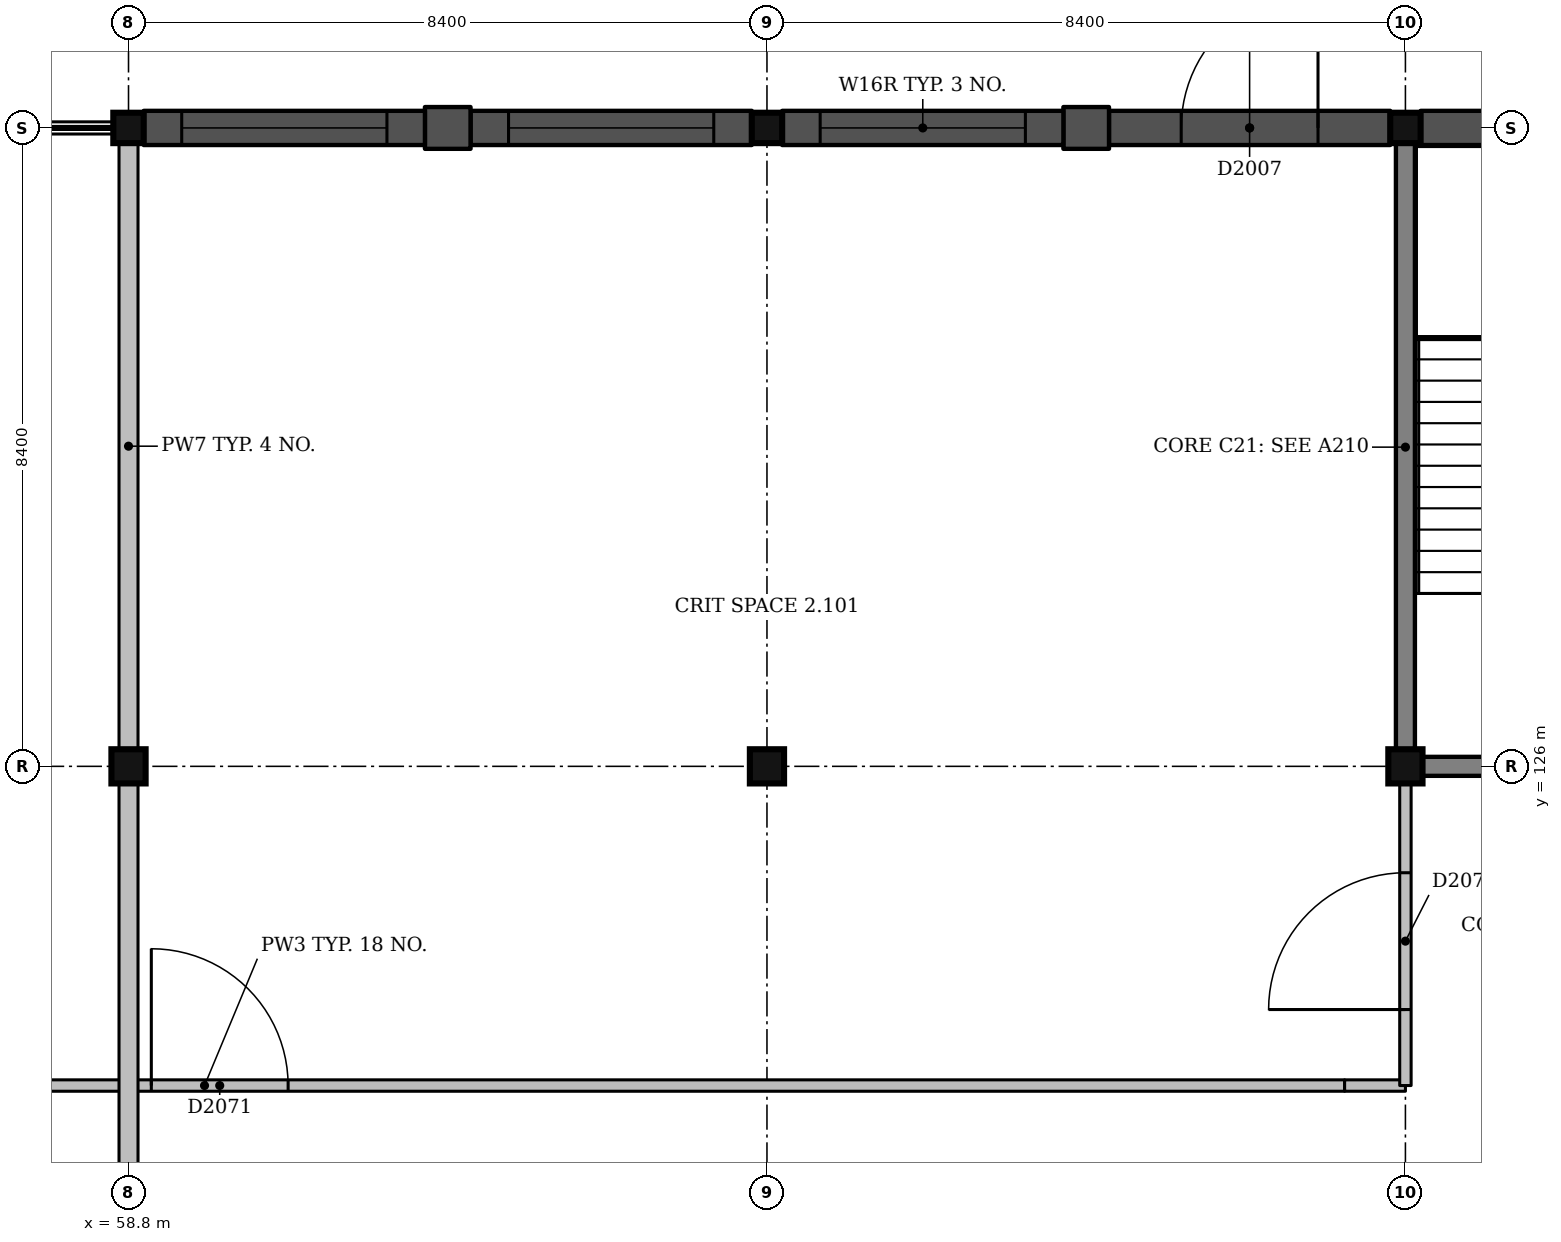
"""IFC4 building model, lengths in metres.
Left out: names, types, materials, properties, quantities, classifications, styles, units other than length and angle.
Written with IfcOpenShell. Run it as: python <this file> out.ifc"""

import sys

from ifc_helpers import new_model, si_unit, direction, frame, frame_2d, origin, origin_2d, place, context, subcontext, project, spatial, rectangle, extrude, element, fill, save


model = new_model("IFC4")
c1 = context("Model", 3, precision=1e-05, world=origin(), true_north=direction((0.0, 1.0)))
c2 = subcontext(c1, "Body", "Model", "MODEL_VIEW")
j1 = project(units=[si_unit("LENGTHUNIT", "METRE"), si_unit("PLANEANGLEUNIT", "RADIAN")], contexts=[c1])
p1 = place(None, origin())
s1 = spatial("IfcSite", under=j1, at=p1, CompositionType="ELEMENT")
p2 = place(p1, origin())
s2 = spatial("IfcBuilding", under=s1, at=p2, CompositionType="ELEMENT")
p3 = place(p2, frame((0.0, 0.0, 9.0)))
s3 = spatial("IfcBuildingStorey", under=s2, at=p3, CompositionType="ELEMENT", Elevation=9.0)
p4 = place(p3, frame((58.8, 126.0, -1.5), z_axis=(0.0, 0.0, 1.0), x_axis=(1.0, 0.0, 0.0)))
e1 = element("IfcColumn", 1, at=p4, inside=s3, PredefinedType="COLUMN", context=c2, shape_type="SweptSolid", body=[
    extrude(rectangle(XDim=0.45, YDim=0.45, at=origin_2d()), origin(), (0.0, 0.0, 1.0), 6.0),
])
p5 = place(p3, frame((58.8, 134.4, -1.5), z_axis=(0.0, 0.0, 1.0), x_axis=(1.0, 0.0, 0.0)))
e2 = element("IfcColumn", 2, at=p5, inside=s3, PredefinedType="COLUMN", context=c2, shape_type="SweptSolid", body=[
    extrude(rectangle(XDim=0.4, YDim=0.4, at=origin_2d()), origin(), (0.0, 0.0, 1.0), 6.0),
])
p6 = place(p3, frame((67.2, 126.0, -1.5), z_axis=(0.0, 0.0, 1.0), x_axis=(1.0, 0.0, 0.0)))
e3 = element("IfcColumn", 3, at=p6, inside=s3, PredefinedType="COLUMN", context=c2, shape_type="SweptSolid", body=[
    extrude(rectangle(XDim=0.45, YDim=0.45, at=origin_2d()), origin(), (0.0, 0.0, 1.0), 6.0),
])
p7 = place(p3, frame((67.2, 134.4, -1.5), z_axis=(0.0, 0.0, 1.0), x_axis=(1.0, 0.0, 0.0)))
e4 = element("IfcColumn", 4, at=p7, inside=s3, PredefinedType="COLUMN", context=c2, shape_type="SweptSolid", body=[
    extrude(rectangle(XDim=0.4, YDim=0.4, at=origin_2d()), origin(), (0.0, 0.0, 1.0), 6.0),
])
p8 = place(p3, frame((75.6, 126.0, -1.5), z_axis=(0.0, 0.0, 1.0), x_axis=(1.0, 0.0, 0.0)))
e5 = element("IfcColumn", 5, at=p8, inside=s3, PredefinedType="COLUMN", context=c2, shape_type="SweptSolid", body=[
    extrude(rectangle(XDim=0.45, YDim=0.45, at=origin_2d()), origin(), (0.0, 0.0, 1.0), 6.0),
])
p9 = place(p3, frame((75.6, 134.4, -1.5), z_axis=(0.0, 0.0, 1.0), x_axis=(1.0, 0.0, 0.0)))
e6 = element("IfcColumn", 6, at=p9, inside=s3, PredefinedType="COLUMN", context=c2, shape_type="SweptSolid", body=[
    extrude(rectangle(XDim=0.4, YDim=0.4, at=origin_2d()), origin(), (0.0, 0.0, 1.0), 6.0),
])
p10 = place(p3, frame((75.825, 126.0, 0.0), z_axis=(0.0, 0.0, 1.0), x_axis=(1.0, 0.0, 0.0)))
e7 = element("IfcWall", 7, at=p10, inside=s3, PredefinedType="SHEAR", context=c2, shape_type="SweptSolid", body=[
    extrude(rectangle(XDim=5.5, YDim=0.25, at=frame_2d((2.75, 0.0))), origin(), (0.0, 0.0, 1.0), 4.5),
])
p11 = place(p10, frame((2.05, 0.0, 0.0)))
e8 = element("IfcOpeningElement", 8, at=p11, cuts=e7, PredefinedType="OPENING", context=c2, shape_type="SweptSolid", body=[
    extrude(rectangle(XDim=1.0, YDim=2.1, at=frame_2d((0.5, 1.05))), frame((0.0, 0.135, 0.0), z_axis=(0.0, -1.0, 0.0), x_axis=(1.0, 0.0, 0.0)), (0.0, 0.0, 1.0), 0.27),
])
p12 = place(p3, frame((75.6, 126.225, 0.0), z_axis=(0.0, 0.0, 1.0), x_axis=(0.0, 1.0, 0.0)))
e9 = element("IfcWall", 9, at=p12, inside=s3, PredefinedType="SHEAR", context=c2, shape_type="SweptSolid", body=[
    extrude(rectangle(XDim=7.975, YDim=0.25, at=frame_2d((3.987, 0.0))), origin(), (0.0, 0.0, 1.0), 4.5),
])
p13 = place(p3, frame((79.5, 134.4, 0.0), z_axis=(0.0, 0.0, 1.0), x_axis=(-1.0, 0.0, 0.0)))
e10 = element("IfcWall", 10, at=p13, inside=s3, PredefinedType="SOLIDWALL", context=c2, shape_type="SweptSolid", body=[
    extrude(rectangle(XDim=3.7, YDim=0.45, at=frame_2d((1.85, 0.0))), origin(), (0.0, 0.0, 1.0), 3.45),
])
p14 = place(p3, frame((75.4, 134.4, 0.0), z_axis=(0.0, 0.0, 1.0), x_axis=(-1.0, 0.0, 0.0)))
e11 = element("IfcWall", 11, at=p14, inside=s3, PredefinedType="SOLIDWALL", context=c2, shape_type="SweptSolid", body=[
    extrude(rectangle(XDim=3.7, YDim=0.45, at=frame_2d((1.85, 0.0))), origin(), (0.0, 0.0, 1.0), 3.45),
])
p15 = place(p14, frame((0.95, 0.0, 0.0)))
e12 = element("IfcOpeningElement", 12, at=p15, cuts=e11, PredefinedType="OPENING", context=c2, shape_type="SweptSolid", body=[
    extrude(rectangle(XDim=1.8, YDim=2.1, at=frame_2d((0.9, 1.05))), frame((0.0, 0.235, 0.0), z_axis=(0.0, -1.0, 0.0), x_axis=(1.0, 0.0, 0.0)), (0.0, 0.0, 1.0), 0.47),
])
p16 = place(p3, frame((71.7, 134.4, 0.0), z_axis=(0.0, 0.0, 1.0), x_axis=(-1.0, 0.0, 0.0)))
e13 = element("IfcWall", 13, at=p16, inside=s3, PredefinedType="SOLIDWALL", context=c2, shape_type="SweptSolid", body=[
    extrude(rectangle(XDim=0.6, YDim=0.55, at=frame_2d((0.3, 0.0))), origin(), (0.0, 0.0, 1.0), 3.45),
])
p17 = place(p3, frame((71.1, 134.4, 0.0), z_axis=(0.0, 0.0, 1.0), x_axis=(-1.0, 0.0, 0.0)))
e14 = element("IfcWall", 14, at=p17, inside=s3, PredefinedType="SOLIDWALL", context=c2, shape_type="SweptSolid", body=[
    extrude(rectangle(XDim=3.7, YDim=0.45, at=frame_2d((1.85, 0.0))), origin(), (0.0, 0.0, 1.0), 3.45),
])
p18 = place(p17, frame((0.5, 0.0, 0.6)))
e15 = element("IfcOpeningElement", 15, at=p18, cuts=e14, PredefinedType="OPENING", context=c2, shape_type="SweptSolid", body=[
    extrude(rectangle(XDim=2.7, YDim=2.4, at=frame_2d((1.35, 1.2))), frame((0.0, 0.235, 0.0), z_axis=(0.0, -1.0, 0.0), x_axis=(1.0, 0.0, 0.0)), (0.0, 0.0, 1.0), 0.47),
])
p19 = place(p3, frame((67.0, 134.4, 0.0), z_axis=(0.0, 0.0, 1.0), x_axis=(-1.0, 0.0, 0.0)))
e16 = element("IfcWall", 16, at=p19, inside=s3, PredefinedType="SOLIDWALL", context=c2, shape_type="SweptSolid", body=[
    extrude(rectangle(XDim=3.7, YDim=0.45, at=frame_2d((1.85, 0.0))), origin(), (0.0, 0.0, 1.0), 3.45),
])
p20 = place(p19, frame((0.5, 0.0, 0.6)))
e17 = element("IfcOpeningElement", 17, at=p20, cuts=e16, PredefinedType="OPENING", context=c2, shape_type="SweptSolid", body=[
    extrude(rectangle(XDim=2.7, YDim=2.4, at=frame_2d((1.35, 1.2))), frame((0.0, 0.235, 0.0), z_axis=(0.0, -1.0, 0.0), x_axis=(1.0, 0.0, 0.0)), (0.0, 0.0, 1.0), 0.47),
])
p21 = place(p3, frame((63.3, 134.4, 0.0), z_axis=(0.0, 0.0, 1.0), x_axis=(-1.0, 0.0, 0.0)))
e18 = element("IfcWall", 18, at=p21, inside=s3, PredefinedType="SOLIDWALL", context=c2, shape_type="SweptSolid", body=[
    extrude(rectangle(XDim=0.6, YDim=0.55, at=frame_2d((0.3, 0.0))), origin(), (0.0, 0.0, 1.0), 3.45),
])
p22 = place(p3, frame((62.7, 134.4, 0.0), z_axis=(0.0, 0.0, 1.0), x_axis=(-1.0, 0.0, 0.0)))
e19 = element("IfcWall", 19, at=p22, inside=s3, PredefinedType="SOLIDWALL", context=c2, shape_type="SweptSolid", body=[
    extrude(rectangle(XDim=3.7, YDim=0.45, at=frame_2d((1.85, 0.0))), origin(), (0.0, 0.0, 1.0), 3.45),
])
p23 = place(p22, frame((0.5, 0.0, 0.6)))
e20 = element("IfcOpeningElement", 20, at=p23, cuts=e19, PredefinedType="OPENING", context=c2, shape_type="SweptSolid", body=[
    extrude(rectangle(XDim=2.7, YDim=2.4, at=frame_2d((1.35, 1.2))), frame((0.0, 0.235, 0.0), z_axis=(0.0, -1.0, 0.0), x_axis=(1.0, 0.0, 0.0)), (0.0, 0.0, 1.0), 0.47),
])
p24 = place(p3, frame((44.8, 121.8, 0.0), z_axis=(0.0, 0.0, 1.0), x_axis=(1.0, 0.0, 0.0)))
e21 = element("IfcWall", 21, at=p24, inside=s3, PredefinedType="PARTITIONING", context=c2, shape_type="SweptSolid", body=[
    extrude(rectangle(XDim=30.0, YDim=0.15, at=frame_2d((15.0, 0.0))), origin(), (0.0, 0.0, 1.0), 3.35),
])
p25 = place(p24, frame((9.05, 0.0, 0.0)))
e22 = element("IfcOpeningElement", 22, at=p25, cuts=e21, PredefinedType="OPENING", context=c2, shape_type="SweptSolid", body=[
    extrude(rectangle(XDim=1.8, YDim=2.1, at=frame_2d((0.9, 1.05))), frame((0.0, 0.085, 0.0), z_axis=(0.0, -1.0, 0.0), x_axis=(1.0, 0.0, 0.0)), (0.0, 0.0, 1.0), 0.17),
])
p26 = place(p24, frame((14.3, 0.0, 0.0)))
e23 = element("IfcOpeningElement", 23, at=p26, cuts=e21, PredefinedType="OPENING", context=c2, shape_type="SweptSolid", body=[
    extrude(rectangle(XDim=1.8, YDim=2.1, at=frame_2d((0.9, 1.05))), frame((0.0, 0.085, 0.0), z_axis=(0.0, -1.0, 0.0), x_axis=(1.0, 0.0, 0.0)), (0.0, 0.0, 1.0), 0.17),
])
p27 = place(p3, frame((74.8, 121.8, 0.0), z_axis=(0.0, 0.0, 1.0), x_axis=(1.0, 0.0, 0.0)))
e24 = element("IfcWall", 24, at=p27, inside=s3, PredefinedType="PARTITIONING", context=c2, shape_type="SweptSolid", body=[
    extrude(rectangle(XDim=0.8, YDim=0.15, at=frame_2d((0.4, 0.0))), origin(), (0.0, 0.0, 1.0), 3.4),
])
p28 = place(p3, frame((58.8, 117.825, 0.0), z_axis=(0.0, 0.0, 1.0), x_axis=(0.0, 1.0, 0.0)))
e25 = element("IfcWall", 25, at=p28, inside=s3, PredefinedType="SOLIDWALL", context=c2, shape_type="SweptSolid", body=[
    extrude(rectangle(XDim=7.95, YDim=0.25, at=frame_2d((3.975, 0.0))), origin(), (0.0, 0.0, 1.0), 3.35),
])
p29 = place(p28, frame((1.0, 0.0, 0.0)))
e26 = element("IfcOpeningElement", 26, at=p29, cuts=e25, PredefinedType="OPENING", context=c2, shape_type="SweptSolid", body=[
    extrude(rectangle(XDim=1.8, YDim=2.1, at=frame_2d((0.9, 1.05))), frame((0.0, 0.135, 0.0), z_axis=(0.0, -1.0, 0.0), x_axis=(1.0, 0.0, 0.0)), (0.0, 0.0, 1.0), 0.27),
])
p30 = place(p3, frame((58.8, 126.225, 0.0), z_axis=(0.0, 0.0, 1.0), x_axis=(0.0, 1.0, 0.0)))
e27 = element("IfcWall", 27, at=p30, inside=s3, PredefinedType="SOLIDWALL", context=c2, shape_type="SweptSolid", body=[
    extrude(rectangle(XDim=7.975, YDim=0.25, at=frame_2d((3.987, 0.0))), origin(), (0.0, 0.0, 1.0), 3.35),
])
p31 = place(p3, frame((75.6, 121.8, 0.0), z_axis=(0.0, 0.0, 1.0), x_axis=(0.0, 1.0, 0.0)))
e28 = element("IfcWall", 28, at=p31, inside=s3, PredefinedType="PARTITIONING", context=c2, shape_type="SweptSolid", body=[
    extrude(rectangle(XDim=3.975, YDim=0.15, at=frame_2d((1.987, 0.0))), origin(), (0.0, 0.0, 1.0), 3.4),
])
p32 = place(p31, frame((1.0, 0.0, 0.0)))
e29 = element("IfcOpeningElement", 29, at=p32, cuts=e28, PredefinedType="OPENING", context=c2, shape_type="SweptSolid", body=[
    extrude(rectangle(XDim=1.8, YDim=2.1, at=frame_2d((0.9, 1.05))), frame((0.0, 0.085, 0.0), z_axis=(0.0, -1.0, 0.0), x_axis=(1.0, 0.0, 0.0)), (0.0, 0.0, 1.0), 0.17),
])
p33 = place(p15, origin())
e30 = element("IfcDoor", 30, at=p33, inside=s3, OperationType="SINGLE_SWING_LEFT", PredefinedType="DOOR", context=c2, shape_type="SweptSolid", body=[
    extrude(rectangle(XDim=1.8, YDim=2.1, at=frame_2d((0.9, 1.05))), frame((0.0, 0.025, 0.0), z_axis=(0.0, -1.0, 0.0), x_axis=(1.0, 0.0, 0.0)), (0.0, 0.0, 1.0), 0.05),
])
fill(e12, e30)
p34 = place(p18, origin())
e31 = element("IfcWindow", 31, at=p34, inside=s3, PartitioningType="SINGLE_PANEL", PredefinedType="WINDOW", context=c2, shape_type="SweptSolid", body=[
    extrude(rectangle(XDim=2.7, YDim=2.4, at=frame_2d((1.35, 1.2))), frame((0.0, 0.135, 0.0), z_axis=(0.0, -1.0, 0.0), x_axis=(1.0, 0.0, 0.0)), (0.0, 0.0, 1.0), 0.06),
])
fill(e15, e31)
p35 = place(p20, origin())
e32 = element("IfcWindow", 32, at=p35, inside=s3, PartitioningType="SINGLE_PANEL", PredefinedType="WINDOW", context=c2, shape_type="SweptSolid", body=[
    extrude(rectangle(XDim=2.7, YDim=2.4, at=frame_2d((1.35, 1.2))), frame((0.0, 0.135, 0.0), z_axis=(0.0, -1.0, 0.0), x_axis=(1.0, 0.0, 0.0)), (0.0, 0.0, 1.0), 0.06),
])
fill(e17, e32)
p36 = place(p23, origin())
e33 = element("IfcWindow", 33, at=p36, inside=s3, PartitioningType="SINGLE_PANEL", PredefinedType="WINDOW", context=c2, shape_type="SweptSolid", body=[
    extrude(rectangle(XDim=2.7, YDim=2.4, at=frame_2d((1.35, 1.2))), frame((0.0, 0.135, 0.0), z_axis=(0.0, -1.0, 0.0), x_axis=(1.0, 0.0, 0.0)), (0.0, 0.0, 1.0), 0.06),
])
fill(e20, e33)
p37 = place(p32, origin())
e34 = element("IfcDoor", 34, at=p37, inside=s3, OperationType="DOUBLE_DOOR_SINGLE_SWING", PredefinedType="DOOR", context=c2, shape_type="SweptSolid", body=[
    extrude(rectangle(XDim=1.8, YDim=2.1, at=frame_2d((0.9, 1.05))), frame((0.0, 0.025, 0.0), z_axis=(0.0, -1.0, 0.0), x_axis=(1.0, 0.0, 0.0)), (0.0, 0.0, 1.0), 0.05),
])
fill(e29, e34)
p38 = place(p26, origin())
e35 = element("IfcDoor", 35, at=p38, inside=s3, OperationType="DOUBLE_DOOR_SINGLE_SWING", PredefinedType="DOOR", context=c2, shape_type="SweptSolid", body=[
    extrude(rectangle(XDim=1.8, YDim=2.1, at=frame_2d((0.9, 1.05))), frame((0.0, 0.025, 0.0), z_axis=(0.0, -1.0, 0.0), x_axis=(1.0, 0.0, 0.0)), (0.0, 0.0, 1.0), 0.05),
])
fill(e23, e35)
save(model, sys.argv[1])
